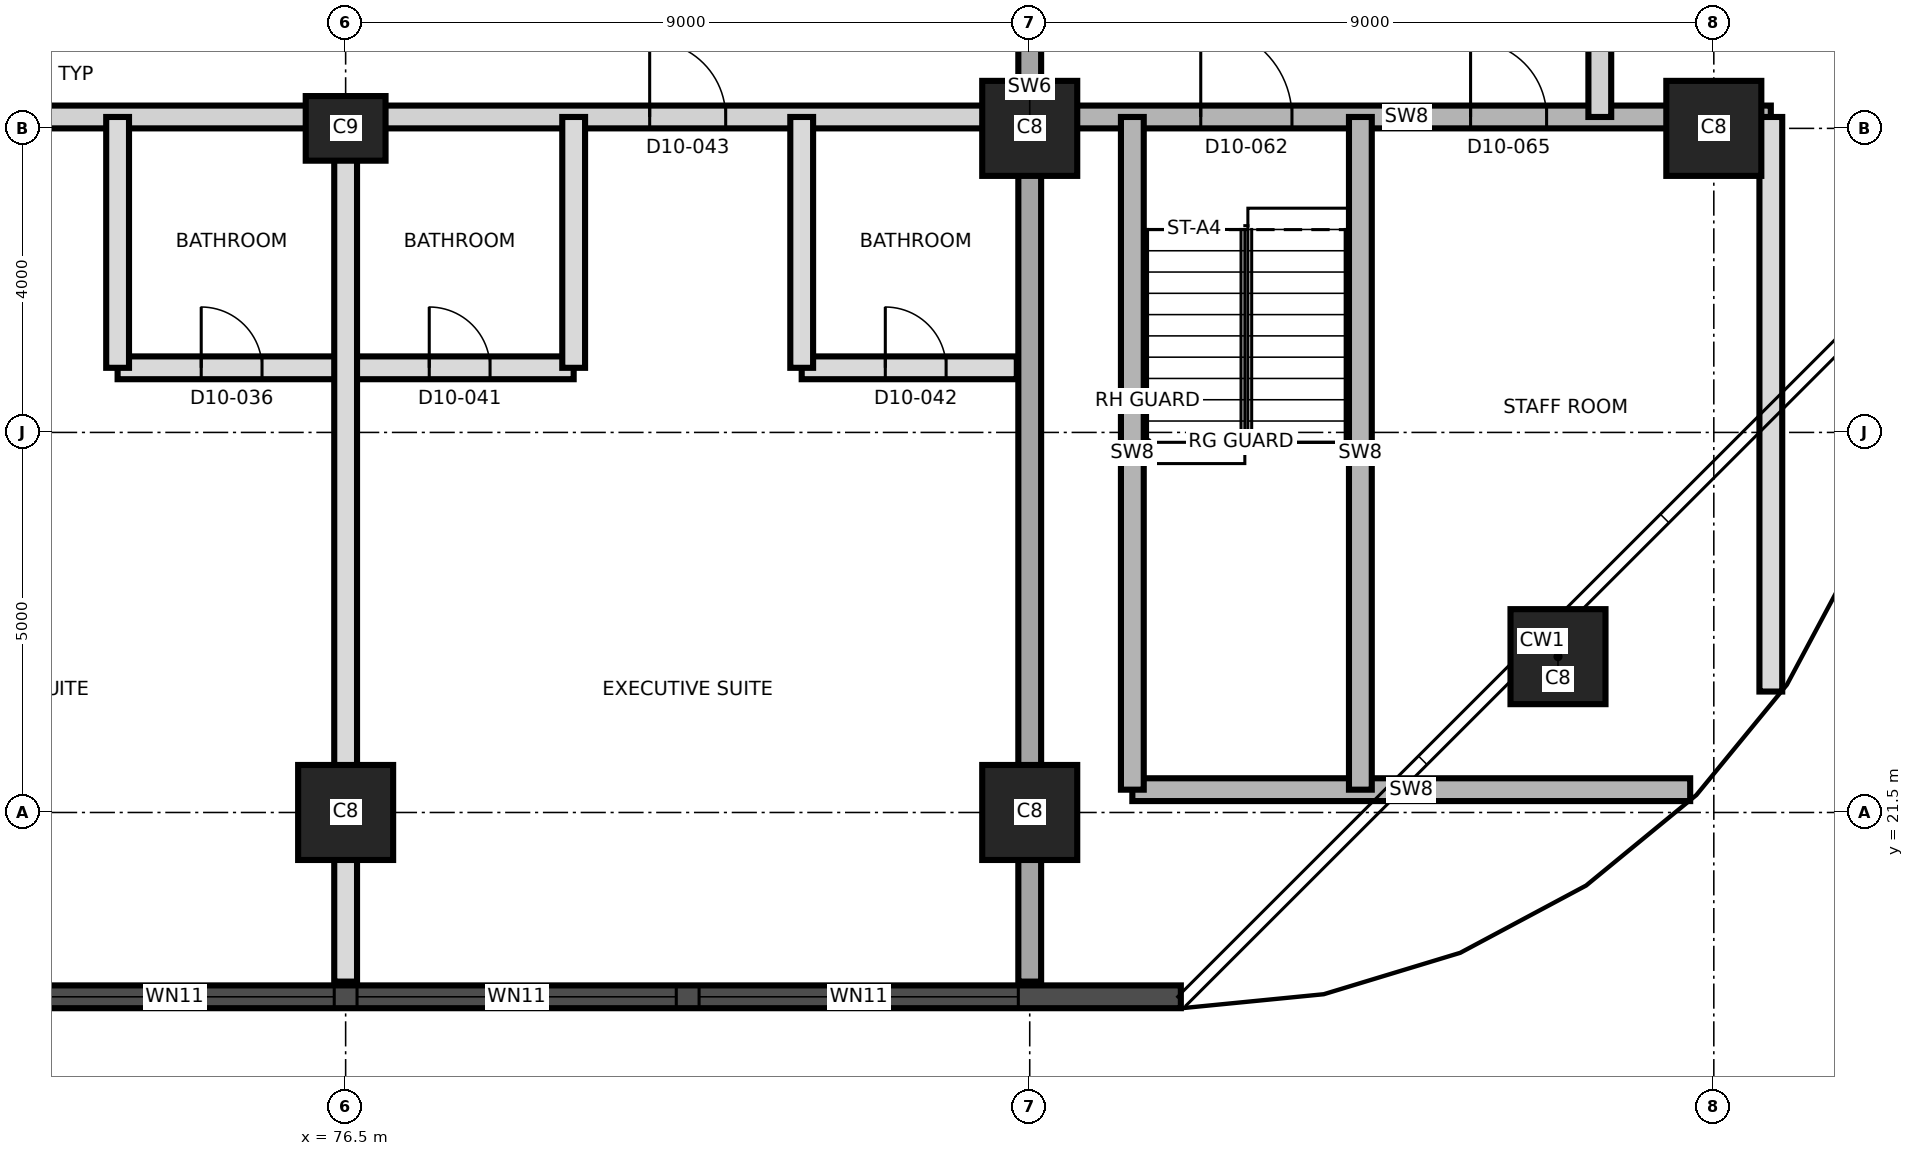
"""IFC4 building model, lengths in metres.
Left out: names, types, materials, properties, quantities, classifications, styles, units other than length and angle.
Written with IfcOpenShell. Run it as: python <this file> out.ifc"""

import sys

from ifc_helpers import new_model, si_unit, direction, frame, frame_2d, origin, origin_2d, place, context, subcontext, project, spatial, rectangle, extrude, element, fill, save


model = new_model("IFC4")
c1 = context("Model", 3, precision=1e-05, world=origin(), true_north=direction((0.0, 1.0)))
c2 = subcontext(c1, "Body", "Model", "MODEL_VIEW")
j1 = project(units=[si_unit("LENGTHUNIT", "METRE"), si_unit("PLANEANGLEUNIT", "RADIAN")], contexts=[c1])
p1 = place(None, origin())
s1 = spatial("IfcSite", under=j1, at=p1, CompositionType="ELEMENT")
p2 = place(p1, origin())
s2 = spatial("IfcBuilding", under=s1, at=p2, CompositionType="ELEMENT")
p3 = place(p2, frame((0.0, 0.0, 116.7)))
s3 = spatial("IfcBuildingStorey", under=s2, at=p3, CompositionType="ELEMENT", Elevation=116.7)
for number, where, z_axis, x_axis in (
    (1, (76.5, 21.5, 0.0), (0.0, 0.0, 1.0), (1.0, 0.0, 0.0)),
    (2, (85.5, 21.5, 0.0), (0.0, 0.0, 1.0), (1.0, 0.0, 0.0)),
    (3, (92.45, 23.55, 0.0), (0.0, 0.0, 1.0), (1.0, 0.0, 0.0)),
):
    element("IfcColumn", number, at=place(p3, frame(where, z_axis=z_axis, x_axis=x_axis)), inside=s3, PredefinedType="COLUMN", context=c2, shape_type="SweptSolid", body=[
        extrude(rectangle(XDim=1.25, YDim=1.25, at=origin_2d()), origin(), (0.0, 0.0, 1.0), 3.7),
    ])
p4 = place(p3, frame((76.5, 30.5, 0.0), z_axis=(0.0, 0.0, 1.0), x_axis=(1.0, 0.0, 0.0)))
e4 = element("IfcColumn", 4, at=p4, inside=s3, PredefinedType="COLUMN", context=c2, shape_type="SweptSolid", body=[
    extrude(rectangle(XDim=1.05, YDim=0.85, at=origin_2d()), origin(), (0.0, 0.0, 1.0), 3.7),
])
for number, where, z_axis, x_axis in (
    (5, (85.5, 30.5, 0.0), (0.0, 0.0, 1.0), (1.0, 0.0, 0.0)),
    (6, (94.5, 30.5, 0.0), (0.0, 0.0, 1.0), (1.0, 0.0, 0.0)),
):
    element("IfcColumn", number, at=place(p3, frame(where, z_axis=z_axis, x_axis=x_axis)), inside=s3, PredefinedType="COLUMN", context=c2, shape_type="SweptSolid", body=[
        extrude(rectangle(XDim=1.25, YDim=1.25, at=origin_2d()), origin(), (0.0, 0.0, 1.0), 3.7),
    ])
p5 = place(p3, frame((85.5, 19.275, 0.0), z_axis=(0.0, 0.0, 1.0), x_axis=(0.0, 1.0, 0.0)))
e7 = element("IfcWall", 7, at=p5, inside=s3, PredefinedType="SHEAR", context=c2, shape_type="SweptSolid", body=[
    extrude(rectangle(XDim=22.45, YDim=0.3, at=frame_2d((11.225, 0.0))), origin(), (0.0, 0.0, 1.0), 3.7),
])
p6 = place(p5, frame((12.425, 0.0, 0.0)))
e8 = element("IfcOpeningElement", 8, at=p6, cuts=e7, PredefinedType="OPENING", context=c2, shape_type="SweptSolid", body=[
    extrude(rectangle(XDim=1.4, YDim=2.1, at=frame_2d((0.7, 1.05))), frame((0.0, 0.16, 0.0), z_axis=(0.0, -1.0, 0.0), x_axis=(1.0, 0.0, 0.0)), (0.0, 0.0, 1.0), 0.32),
])
p7 = place(p3, frame((44.01, 19.075, 0.0), z_axis=(0.0, 0.0, 1.0), x_axis=(1.0, 0.0, 0.0)))
e9 = element("IfcWall", 9, at=p7, inside=s3, PredefinedType="SOLIDWALL", context=c2, shape_type="SweptSolid", body=[
    extrude(rectangle(XDim=43.478, YDim=0.3, at=frame_2d((21.739, 0.0))), origin(), (0.0, 0.0, 1.0), 3.4),
])
p8 = place(p7, frame((1.845, 0.0, 0.3)))
e10 = element("IfcOpeningElement", 10, at=p8, cuts=e9, PredefinedType="OPENING", context=c2, shape_type="SweptSolid", body=[
    extrude(rectangle(XDim=1.8, YDim=2.4, at=frame_2d((0.9, 1.2))), frame((0.0, 0.16, 0.0), z_axis=(0.0, -1.0, 0.0), x_axis=(1.0, 0.0, 0.0)), (0.0, 0.0, 1.0), 0.32),
])
p9 = place(p7, frame((5.64, 0.0, 0.9)))
e11 = element("IfcOpeningElement", 11, at=p9, cuts=e9, PredefinedType="OPENING", context=c2, shape_type="SweptSolid", body=[
    extrude(rectangle(XDim=4.2, YDim=1.5, at=frame_2d((2.1, 0.75))), frame((0.0, 0.16, 0.0), z_axis=(0.0, -1.0, 0.0), x_axis=(1.0, 0.0, 0.0)), (0.0, 0.0, 1.0), 0.32),
])
p10 = place(p7, frame((10.14, 0.0, 0.9)))
e12 = element("IfcOpeningElement", 12, at=p10, cuts=e9, PredefinedType="OPENING", context=c2, shape_type="SweptSolid", body=[
    extrude(rectangle(XDim=4.2, YDim=1.5, at=frame_2d((2.1, 0.75))), frame((0.0, 0.16, 0.0), z_axis=(0.0, -1.0, 0.0), x_axis=(1.0, 0.0, 0.0)), (0.0, 0.0, 1.0), 0.32),
])
p11 = place(p7, frame((14.64, 0.0, 0.9)))
e13 = element("IfcOpeningElement", 13, at=p11, cuts=e9, PredefinedType="OPENING", context=c2, shape_type="SweptSolid", body=[
    extrude(rectangle(XDim=4.2, YDim=1.5, at=frame_2d((2.1, 0.75))), frame((0.0, 0.16, 0.0), z_axis=(0.0, -1.0, 0.0), x_axis=(1.0, 0.0, 0.0)), (0.0, 0.0, 1.0), 0.32),
])
p12 = place(p7, frame((19.14, 0.0, 0.9)))
e14 = element("IfcOpeningElement", 14, at=p12, cuts=e9, PredefinedType="OPENING", context=c2, shape_type="SweptSolid", body=[
    extrude(rectangle(XDim=4.2, YDim=1.5, at=frame_2d((2.1, 0.75))), frame((0.0, 0.16, 0.0), z_axis=(0.0, -1.0, 0.0), x_axis=(1.0, 0.0, 0.0)), (0.0, 0.0, 1.0), 0.32),
])
p13 = place(p7, frame((23.64, 0.0, 0.9)))
e15 = element("IfcOpeningElement", 15, at=p13, cuts=e9, PredefinedType="OPENING", context=c2, shape_type="SweptSolid", body=[
    extrude(rectangle(XDim=4.2, YDim=1.5, at=frame_2d((2.1, 0.75))), frame((0.0, 0.16, 0.0), z_axis=(0.0, -1.0, 0.0), x_axis=(1.0, 0.0, 0.0)), (0.0, 0.0, 1.0), 0.32),
])
p14 = place(p7, frame((28.14, 0.0, 0.9)))
e16 = element("IfcOpeningElement", 16, at=p14, cuts=e9, PredefinedType="OPENING", context=c2, shape_type="SweptSolid", body=[
    extrude(rectangle(XDim=4.2, YDim=1.5, at=frame_2d((2.1, 0.75))), frame((0.0, 0.16, 0.0), z_axis=(0.0, -1.0, 0.0), x_axis=(1.0, 0.0, 0.0)), (0.0, 0.0, 1.0), 0.32),
])
p15 = place(p7, frame((32.64, 0.0, 0.9)))
e17 = element("IfcOpeningElement", 17, at=p15, cuts=e9, PredefinedType="OPENING", context=c2, shape_type="SweptSolid", body=[
    extrude(rectangle(XDim=4.2, YDim=1.5, at=frame_2d((2.1, 0.75))), frame((0.0, 0.16, 0.0), z_axis=(0.0, -1.0, 0.0), x_axis=(1.0, 0.0, 0.0)), (0.0, 0.0, 1.0), 0.32),
])
p16 = place(p7, frame((37.14, 0.0, 0.9)))
e18 = element("IfcOpeningElement", 18, at=p16, cuts=e9, PredefinedType="OPENING", context=c2, shape_type="SweptSolid", body=[
    extrude(rectangle(XDim=4.2, YDim=1.5, at=frame_2d((2.1, 0.75))), frame((0.0, 0.16, 0.0), z_axis=(0.0, -1.0, 0.0), x_axis=(1.0, 0.0, 0.0)), (0.0, 0.0, 1.0), 0.32),
])
p17 = place(p3, frame((86.85, 21.8, 0.0), z_axis=(0.0, 0.0, 1.0), x_axis=(1.0, 0.0, 0.0)))
e19 = element("IfcWall", 19, at=p17, inside=s3, PredefinedType="SHEAR", context=c2, shape_type="SweptSolid", body=[
    extrude(rectangle(XDim=7.339, YDim=0.3, at=frame_2d((3.669, 0.0))), origin(), (0.0, 0.0, 1.0), 3.4),
])
p18 = place(p3, frame((73.5, 27.35, 0.0), z_axis=(0.0, 0.0, 1.0), x_axis=(1.0, 0.0, 0.0)))
e20 = element("IfcWall", 20, at=p18, inside=s3, PredefinedType="PARTITIONING", context=c2, shape_type="SweptSolid", body=[
    extrude(rectangle(XDim=6.0, YDim=0.3, at=frame_2d((3.0, 0.0))), origin(), (0.0, 0.0, 1.0), 3.4),
])
p19 = place(p18, frame((1.1, 0.0, 0.0)))
e21 = element("IfcOpeningElement", 21, at=p19, cuts=e20, PredefinedType="OPENING", context=c2, shape_type="SweptSolid", body=[
    extrude(rectangle(XDim=0.8, YDim=2.1, at=frame_2d((0.4, 1.05))), frame((0.0, 0.16, 0.0), z_axis=(0.0, -1.0, 0.0), x_axis=(1.0, 0.0, 0.0)), (0.0, 0.0, 1.0), 0.32),
])
p20 = place(p18, frame((4.1, 0.0, 0.0)))
e22 = element("IfcOpeningElement", 22, at=p20, cuts=e20, PredefinedType="OPENING", context=c2, shape_type="SweptSolid", body=[
    extrude(rectangle(XDim=0.8, YDim=2.1, at=frame_2d((0.4, 1.05))), frame((0.0, 0.16, 0.0), z_axis=(0.0, -1.0, 0.0), x_axis=(1.0, 0.0, 0.0)), (0.0, 0.0, 1.0), 0.32),
])
p21 = place(p3, frame((82.5, 27.35, 0.0), z_axis=(0.0, 0.0, 1.0), x_axis=(1.0, 0.0, 0.0)))
e23 = element("IfcWall", 23, at=p21, inside=s3, PredefinedType="PARTITIONING", context=c2, shape_type="SweptSolid", body=[
    extrude(rectangle(XDim=2.83, YDim=0.3, at=frame_2d((1.415, 0.0))), origin(), (0.0, 0.0, 1.0), 3.4),
])
p22 = place(p21, frame((1.1, 0.0, 0.0)))
e24 = element("IfcOpeningElement", 24, at=p22, cuts=e23, PredefinedType="OPENING", context=c2, shape_type="SweptSolid", body=[
    extrude(rectangle(XDim=0.8, YDim=2.1, at=frame_2d((0.4, 1.05))), frame((0.0, 0.16, 0.0), z_axis=(0.0, -1.0, 0.0), x_axis=(1.0, 0.0, 0.0)), (0.0, 0.0, 1.0), 0.32),
])
p23 = place(p3, frame((58.8, 30.65, 0.0), z_axis=(0.0, 0.0, 1.0), x_axis=(1.0, 0.0, 0.0)))
e25 = element("IfcWall", 25, at=p23, inside=s3, PredefinedType="PARTITIONING", context=c2, shape_type="SweptSolid", body=[
    extrude(rectangle(XDim=26.53, YDim=0.3, at=frame_2d((13.265, 0.0))), origin(), (0.0, 0.0, 1.0), 3.4),
])
p24 = place(p23, frame((0.835, 0.0, 0.0)))
e26 = element("IfcOpeningElement", 26, at=p24, cuts=e25, PredefinedType="OPENING", context=c2, shape_type="SweptSolid", body=[
    extrude(rectangle(XDim=1.2, YDim=2.1, at=frame_2d((0.6, 1.05))), frame((0.0, 0.16, 0.0), z_axis=(0.0, -1.0, 0.0), x_axis=(1.0, 0.0, 0.0)), (0.0, 0.0, 1.0), 0.32),
])
p25 = place(p23, frame((4.085, 0.0, 0.0)))
e27 = element("IfcOpeningElement", 27, at=p25, cuts=e25, PredefinedType="OPENING", context=c2, shape_type="SweptSolid", body=[
    extrude(rectangle(XDim=1.0, YDim=2.1, at=frame_2d((0.5, 1.05))), frame((0.0, 0.16, 0.0), z_axis=(0.0, -1.0, 0.0), x_axis=(1.0, 0.0, 0.0)), (0.0, 0.0, 1.0), 0.32),
])
p26 = place(p23, frame((12.7, 0.0, 0.0)))
e28 = element("IfcOpeningElement", 28, at=p26, cuts=e25, PredefinedType="OPENING", context=c2, shape_type="SweptSolid", body=[
    extrude(rectangle(XDim=1.0, YDim=2.4, at=frame_2d((0.5, 1.2))), frame((0.0, 0.16, 0.0), z_axis=(0.0, -1.0, 0.0), x_axis=(1.0, 0.0, 0.0)), (0.0, 0.0, 1.0), 0.32),
])
p27 = place(p23, frame((21.7, 0.0, 0.0)))
e29 = element("IfcOpeningElement", 29, at=p27, cuts=e25, PredefinedType="OPENING", context=c2, shape_type="SweptSolid", body=[
    extrude(rectangle(XDim=1.0, YDim=2.4, at=frame_2d((0.5, 1.2))), frame((0.0, 0.16, 0.0), z_axis=(0.0, -1.0, 0.0), x_axis=(1.0, 0.0, 0.0)), (0.0, 0.0, 1.0), 0.32),
])
p28 = place(p3, frame((85.67, 30.65, 0.0), z_axis=(0.0, 0.0, 1.0), x_axis=(1.0, 0.0, 0.0)))
e30 = element("IfcWall", 30, at=p28, inside=s3, PredefinedType="SHEAR", context=c2, shape_type="SweptSolid", body=[
    extrude(rectangle(XDim=9.58, YDim=0.3, at=frame_2d((4.79, 0.0))), origin(), (0.0, 0.0, 1.0), 3.4),
])
p29 = place(p28, frame((2.08, 0.0, 0.0)))
e31 = element("IfcOpeningElement", 31, at=p29, cuts=e30, PredefinedType="OPENING", context=c2, shape_type="SweptSolid", body=[
    extrude(rectangle(XDim=1.2, YDim=2.1, at=frame_2d((0.6, 1.05))), frame((0.0, 0.16, 0.0), z_axis=(0.0, -1.0, 0.0), x_axis=(1.0, 0.0, 0.0)), (0.0, 0.0, 1.0), 0.32),
])
p30 = place(p28, frame((5.63, 0.0, 0.0)))
e32 = element("IfcOpeningElement", 32, at=p30, cuts=e30, PredefinedType="OPENING", context=c2, shape_type="SweptSolid", body=[
    extrude(rectangle(XDim=1.0, YDim=2.1, at=frame_2d((0.5, 1.05))), frame((0.0, 0.16, 0.0), z_axis=(0.0, -1.0, 0.0), x_axis=(1.0, 0.0, 0.0)), (0.0, 0.0, 1.0), 0.32),
])
p31 = place(p3, frame((73.5, 27.35, 0.0), z_axis=(0.0, 0.0, 1.0), x_axis=(0.0, 1.0, 0.0)))
e33 = element("IfcWall", 33, at=p31, inside=s3, PredefinedType="PARTITIONING", context=c2, shape_type="SweptSolid", body=[
    extrude(rectangle(XDim=3.3, YDim=0.3, at=frame_2d((1.65, 0.0))), origin(), (0.0, 0.0, 1.0), 3.4),
])
p32 = place(p3, frame((76.5, 19.275, 0.0), z_axis=(0.0, 0.0, 1.0), x_axis=(0.0, 1.0, 0.0)))
e34 = element("IfcWall", 34, at=p32, inside=s3, PredefinedType="PARTITIONING", context=c2, shape_type="SweptSolid", body=[
    extrude(rectangle(XDim=11.375, YDim=0.3, at=frame_2d((5.688, 0.0))), origin(), (0.0, 0.0, 1.0), 3.4),
])
for number, where, z_axis, x_axis in (
    (35, (79.5, 27.35, 0.0), (0.0, 0.0, 1.0), (0.0, 1.0, 0.0)),
    (36, (82.5, 27.35, 0.0), (0.0, 0.0, 1.0), (0.0, 1.0, 0.0)),
):
    element("IfcWall", number, at=place(p3, frame(where, z_axis=z_axis, x_axis=x_axis)), inside=s3, PredefinedType="PARTITIONING", context=c2, shape_type="SweptSolid", body=[
        extrude(rectangle(XDim=3.3, YDim=0.3, at=frame_2d((1.65, 0.0))), origin(), (0.0, 0.0, 1.0), 3.4),
    ])
for number, where, z_axis, x_axis in (
    (37, (86.85, 21.8, 0.0), (0.0, 0.0, 1.0), (0.0, 1.0, 0.0)),
    (38, (89.85, 21.8, 0.0), (0.0, 0.0, 1.0), (0.0, 1.0, 0.0)),
):
    element("IfcWall", number, at=place(p3, frame(where, z_axis=z_axis, x_axis=x_axis)), inside=s3, PredefinedType="SHEAR", context=c2, shape_type="SweptSolid", body=[
        extrude(rectangle(XDim=8.85, YDim=0.3, at=frame_2d((4.425, 0.0))), origin(), (0.0, 0.0, 1.0), 3.4),
    ])
p33 = place(p3, frame((93.0, 30.65, 0.0), z_axis=(0.0, 0.0, 1.0), x_axis=(0.0, 1.0, 0.0)))
e39 = element("IfcWall", 39, at=p33, inside=s3, PredefinedType="PARTITIONING", context=c2, shape_type="SweptSolid", body=[
    extrude(rectangle(XDim=2.7, YDim=0.3, at=frame_2d((1.35, 0.0))), origin(), (0.0, 0.0, 1.0), 3.4),
])
p34 = place(p3, frame((95.25, 23.091, 0.0), z_axis=(0.0, 0.0, 1.0), x_axis=(0.0, 1.0, 0.0)))
e40 = element("IfcWall", 40, at=p34, inside=s3, PredefinedType="PARTITIONING", context=c2, shape_type="SweptSolid", body=[
    extrude(rectangle(XDim=7.559, YDim=0.3, at=frame_2d((3.779, 0.0))), origin(), (0.0, 0.0, 1.0), 3.4),
])
p35 = place(p14, origin())
e41 = element("IfcWindow", 41, at=p35, inside=s3, PartitioningType="SINGLE_PANEL", PredefinedType="WINDOW", context=c2, shape_type="SweptSolid", body=[
    extrude(rectangle(XDim=4.2, YDim=1.5, at=frame_2d((2.1, 0.75))), frame((0.0, 0.03, 0.0), z_axis=(0.0, -1.0, 0.0), x_axis=(1.0, 0.0, 0.0)), (0.0, 0.0, 1.0), 0.06),
])
fill(e16, e41)
p36 = place(p15, origin())
e42 = element("IfcWindow", 42, at=p36, inside=s3, PartitioningType="SINGLE_PANEL", PredefinedType="WINDOW", context=c2, shape_type="SweptSolid", body=[
    extrude(rectangle(XDim=4.2, YDim=1.5, at=frame_2d((2.1, 0.75))), frame((0.0, 0.03, 0.0), z_axis=(0.0, -1.0, 0.0), x_axis=(1.0, 0.0, 0.0)), (0.0, 0.0, 1.0), 0.06),
])
fill(e17, e42)
p37 = place(p16, origin())
e43 = element("IfcWindow", 43, at=p37, inside=s3, PartitioningType="SINGLE_PANEL", PredefinedType="WINDOW", context=c2, shape_type="SweptSolid", body=[
    extrude(rectangle(XDim=4.2, YDim=1.5, at=frame_2d((2.1, 0.75))), frame((0.0, 0.03, 0.0), z_axis=(0.0, -1.0, 0.0), x_axis=(1.0, 0.0, 0.0)), (0.0, 0.0, 1.0), 0.06),
])
fill(e18, e43)
p38 = place(p19, origin())
e44 = element("IfcDoor", 44, at=p38, inside=s3, OperationType="SINGLE_SWING_RIGHT", PredefinedType="DOOR", context=c2, shape_type="SweptSolid", body=[
    extrude(rectangle(XDim=0.8, YDim=2.1, at=frame_2d((0.4, 1.05))), frame((0.0, 0.025, 0.0), z_axis=(0.0, -1.0, 0.0), x_axis=(1.0, 0.0, 0.0)), (0.0, 0.0, 1.0), 0.05),
])
fill(e21, e44)
p39 = place(p20, origin())
e45 = element("IfcDoor", 45, at=p39, inside=s3, OperationType="SINGLE_SWING_LEFT", PredefinedType="DOOR", context=c2, shape_type="SweptSolid", body=[
    extrude(rectangle(XDim=0.8, YDim=2.1, at=frame_2d((0.4, 1.05))), frame((0.0, 0.025, 0.0), z_axis=(0.0, -1.0, 0.0), x_axis=(1.0, 0.0, 0.0)), (0.0, 0.0, 1.0), 0.05),
])
fill(e22, e45)
p40 = place(p22, origin())
e46 = element("IfcDoor", 46, at=p40, inside=s3, OperationType="SINGLE_SWING_RIGHT", PredefinedType="DOOR", context=c2, shape_type="SweptSolid", body=[
    extrude(rectangle(XDim=0.8, YDim=2.1, at=frame_2d((0.4, 1.05))), frame((0.0, 0.025, 0.0), z_axis=(0.0, -1.0, 0.0), x_axis=(1.0, 0.0, 0.0)), (0.0, 0.0, 1.0), 0.05),
])
fill(e24, e46)
p41 = place(p27, origin())
e47 = element("IfcDoor", 47, at=p41, inside=s3, OperationType="SINGLE_SWING_LEFT", PredefinedType="DOOR", context=c2, shape_type="SweptSolid", body=[
    extrude(rectangle(XDim=1.0, YDim=2.4, at=frame_2d((0.5, 1.2))), frame((0.0, 0.025, 0.0), z_axis=(0.0, -1.0, 0.0), x_axis=(1.0, 0.0, 0.0)), (0.0, 0.0, 1.0), 0.05),
])
fill(e29, e47)
p42 = place(p29, origin())
e48 = element("IfcDoor", 48, at=p42, inside=s3, OperationType="SINGLE_SWING_LEFT", PredefinedType="DOOR", context=c2, shape_type="SweptSolid", body=[
    extrude(rectangle(XDim=1.2, YDim=2.1, at=frame_2d((0.6, 1.05))), frame((0.0, 0.025, 0.0), z_axis=(0.0, -1.0, 0.0), x_axis=(1.0, 0.0, 0.0)), (0.0, 0.0, 1.0), 0.05),
])
fill(e31, e48)
p43 = place(p30, origin())
e49 = element("IfcDoor", 49, at=p43, inside=s3, OperationType="SINGLE_SWING_LEFT", PredefinedType="DOOR", context=c2, shape_type="SweptSolid", body=[
    extrude(rectangle(XDim=1.0, YDim=2.1, at=frame_2d((0.5, 1.05))), frame((0.0, 0.025, 0.0), z_axis=(0.0, -1.0, 0.0), x_axis=(1.0, 0.0, 0.0)), (0.0, 0.0, 1.0), 0.05),
])
fill(e32, e49)
save(model, sys.argv[1])
